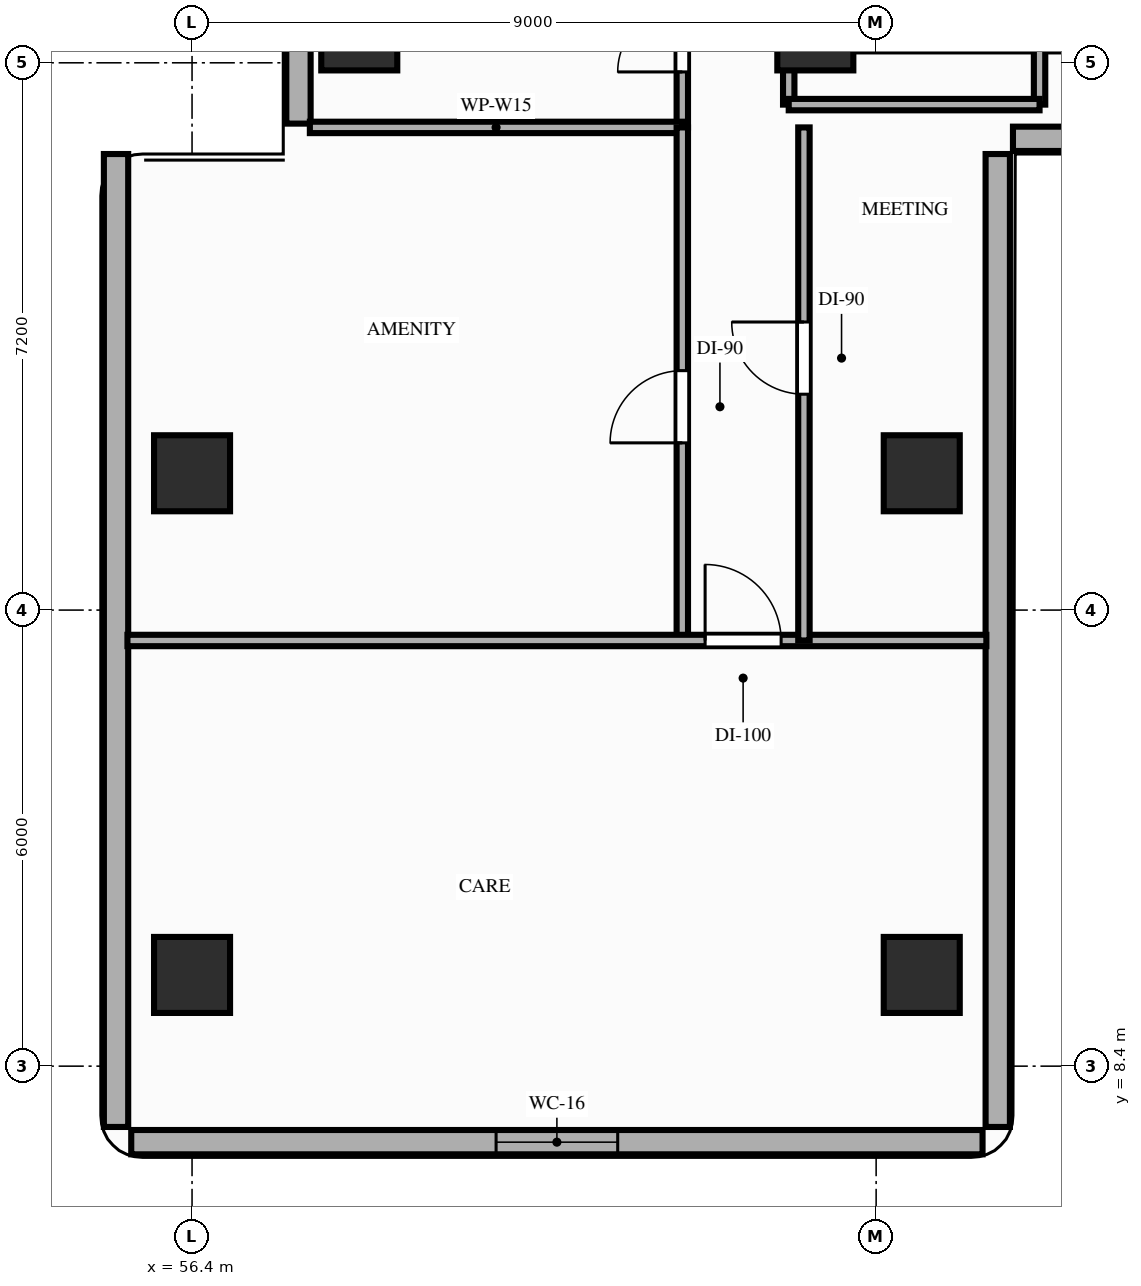
"""IFC4 building model, lengths in metres.
Left out: names, types, materials, properties, quantities, classifications, styles, units other than length and angle.
Written with IfcOpenShell. Run it as: python <this file> out.ifc"""

import sys

from ifc_helpers import new_model, si_unit, direction, frame, frame_2d, origin, origin_2d, place, context, subcontext, project, spatial, rectangle, extrude, element, fill, save


model = new_model("IFC4")
c1 = context("Model", 3, precision=1e-05, world=origin(), true_north=direction((0.0, 1.0)))
c2 = subcontext(c1, "Body", "Model", "MODEL_VIEW")
j1 = project(units=[si_unit("LENGTHUNIT", "METRE"), si_unit("PLANEANGLEUNIT", "RADIAN")], contexts=[c1])
p1 = place(None, origin())
s1 = spatial("IfcSite", under=j1, at=p1, CompositionType="ELEMENT")
p2 = place(p1, origin())
s2 = spatial("IfcBuilding", under=s1, at=p2, CompositionType="ELEMENT")
p3 = place(p2, frame((0.0, 0.0, 50.0)))
s3 = spatial("IfcBuildingStorey", under=s2, at=p3, CompositionType="ELEMENT", Elevation=50.0)
for number, where, z_axis, x_axis in (
    (1, (64.6, 22.0, 0.0), (0.0, 0.0, 1.0), (1.0, 0.0, 0.0)),
    (2, (58.6, 22.0, 0.0), (0.0, 0.0, 1.0), (1.0, 0.0, 0.0)),
    (3, (56.4, 9.6, 0.0), (0.0, 0.0, 1.0), (1.0, 0.0, 0.0)),
    (4, (56.4, 16.2, 0.0), (0.0, 0.0, 1.0), (1.0, 0.0, 0.0)),
    (5, (66.0, 9.6, 0.0), (0.0, 0.0, 1.0), (1.0, 0.0, 0.0)),
    (6, (66.0, 16.2, 0.0), (0.0, 0.0, 1.0), (1.0, 0.0, 0.0)),
):
    element("IfcColumn", number, at=place(p3, frame(where, z_axis=z_axis, x_axis=x_axis)), inside=s3, PredefinedType="COLUMN", context=c2, shape_type="SweptSolid", body=[
        extrude(rectangle(XDim=1.0, YDim=1.0, at=origin_2d()), origin(), (0.0, 0.0, 1.0), 3.2),
    ])
p4 = place(p3, frame((57.8, 43.4, 0.0), z_axis=(0.0, 0.0, 1.0), x_axis=(0.0, -1.0, 0.0)))
e7 = element("IfcWall", 7, at=p4, inside=s3, PredefinedType="STANDARD", context=c2, shape_type="SweptSolid", body=[
    extrude(rectangle(XDim=22.6, YDim=0.32, at=frame_2d((11.3, 0.0))), origin(), (0.0, 0.0, 1.0), 2.51),
])
p5 = place(p4, frame((3.7, 0.0, 0.0)))
e8 = element("IfcOpeningElement", 8, at=p5, cuts=e7, PredefinedType="OPENING", context=c2, shape_type="SweptSolid", body=[
    extrude(rectangle(XDim=1.4, YDim=2.1, at=frame_2d((0.7, 1.05))), frame((0.0, 0.17, 0.0), z_axis=(0.0, -1.0, 0.0), x_axis=(1.0, 0.0, 0.0)), (0.0, 0.0, 1.0), 0.34),
])
p6 = place(p3, frame((55.6, 7.4, 0.0), z_axis=(0.0, 0.0, 1.0), x_axis=(1.0, 0.0, 0.0)))
e9 = element("IfcWall", 9, at=p6, inside=s3, PredefinedType="STANDARD", context=c2, shape_type="SweptSolid", body=[
    extrude(rectangle(XDim=11.2, YDim=0.32, at=frame_2d((5.6, 0.0))), origin(), (0.0, 0.0, 1.0), 3.02),
])
p7 = place(p6, frame((4.8, 0.0, 0.85)))
e10 = element("IfcOpeningElement", 10, at=p7, cuts=e9, PredefinedType="OPENING", context=c2, shape_type="SweptSolid", body=[
    extrude(rectangle(XDim=1.6, YDim=1.7, at=frame_2d((0.8, 0.85))), frame((0.0, 0.17, 0.0), z_axis=(0.0, -1.0, 0.0), x_axis=(1.0, 0.0, 0.0)), (0.0, 0.0, 1.0), 0.34),
])
for number, where, z_axis, x_axis in (
    (11, (55.4, 20.4, 0.0), (0.0, 0.0, 1.0), (0.0, -1.0, 0.0)),
    (12, (67.0, 7.6, 0.0), (0.0, 0.0, 1.0), (0.0, 1.0, 0.0)),
):
    element("IfcWall", number, at=place(p3, frame(where, z_axis=z_axis, x_axis=x_axis)), inside=s3, PredefinedType="STANDARD", context=c2, shape_type="SweptSolid", body=[
        extrude(rectangle(XDim=12.8, YDim=0.32, at=frame_2d((6.4, 0.0))), origin(), (0.0, 0.0, 1.0), 3.02),
    ])
p8 = place(p3, frame((67.2, 20.6, 0.0), z_axis=(0.0, 0.0, 1.0), x_axis=(1.0, 0.0, 0.0)))
e13 = element("IfcWall", 13, at=p8, inside=s3, PredefinedType="STANDARD", context=c2, shape_type="SweptSolid", body=[
    extrude(rectangle(XDim=5.6, YDim=0.32, at=frame_2d((2.8, 0.0))), origin(), (0.0, 0.0, 1.0), 3.02),
])
p9 = place(p3, frame((64.25, 21.05, 0.0), z_axis=(0.0, 0.0, 1.0), x_axis=(0.0, 1.0, 0.0)))
e14 = element("IfcWall", 14, at=p9, inside=s3, PredefinedType="PARTITIONING", context=c2, shape_type="SweptSolid", body=[
    extrude(rectangle(XDim=6.55, YDim=0.15, at=frame_2d((3.275, 0.0))), origin(), (0.0, 0.0, 1.0), 2.51),
])
p10 = place(p9, frame((3.1, 0.0, 0.0)))
e15 = element("IfcOpeningElement", 15, at=p10, cuts=e14, PredefinedType="OPENING", context=c2, shape_type="SweptSolid", body=[
    extrude(rectangle(XDim=0.95, YDim=2.15, at=frame_2d((0.475, 1.075))), frame((0.0, 0.085, 0.0), z_axis=(0.0, -1.0, 0.0), x_axis=(1.0, 0.0, 0.0)), (0.0, 0.0, 1.0), 0.17),
])
p11 = place(p3, frame((67.55, 21.05, 0.0), z_axis=(0.0, 0.0, 1.0), x_axis=(0.0, 1.0, 0.0)))
e16 = element("IfcWall", 16, at=p11, inside=s3, PredefinedType="PARTITIONING", context=c2, shape_type="SweptSolid", body=[
    extrude(rectangle(XDim=6.47, YDim=0.15, at=frame_2d((3.235, 0.0))), origin(), (0.0, 0.0, 1.0), 2.51),
])
p12 = place(p3, frame((64.25, 21.05, 0.0), z_axis=(0.0, 0.0, 1.0), x_axis=(1.0, 0.0, 0.0)))
e17 = element("IfcWall", 17, at=p12, inside=s3, PredefinedType="PARTITIONING", context=c2, shape_type="SweptSolid", body=[
    extrude(rectangle(XDim=3.3, YDim=0.15, at=frame_2d((1.65, 0.0))), origin(), (0.0, 0.0, 1.0), 2.51),
])
p13 = place(p3, frame((62.85, 20.75, 0.0), z_axis=(0.0, 0.0, 1.0), x_axis=(0.0, 1.0, 0.0)))
e18 = element("IfcWall", 18, at=p13, inside=s3, PredefinedType="PARTITIONING", context=c2, shape_type="SweptSolid", body=[
    extrude(rectangle(XDim=22.7, YDim=0.15, at=frame_2d((11.35, 0.0))), origin(), (0.0, 0.0, 1.0), 2.51),
])
p14 = place(p13, frame((0.73, 0.0, 0.0)))
e19 = element("IfcOpeningElement", 19, at=p14, cuts=e18, PredefinedType="OPENING", context=c2, shape_type="SweptSolid", body=[
    extrude(rectangle(XDim=0.85, YDim=2.1, at=frame_2d((0.425, 1.05))), frame((0.0, 0.085, 0.0), z_axis=(0.0, -1.0, 0.0), x_axis=(1.0, 0.0, 0.0)), (0.0, 0.0, 1.0), 0.17),
])
p15 = place(p13, frame((3.43, 0.0, 0.0)))
e20 = element("IfcOpeningElement", 20, at=p15, cuts=e18, PredefinedType="OPENING", context=c2, shape_type="SweptSolid", body=[
    extrude(rectangle(XDim=0.95, YDim=2.1, at=frame_2d((0.475, 1.05))), frame((0.0, 0.085, 0.0), z_axis=(0.0, -1.0, 0.0), x_axis=(1.0, 0.0, 0.0)), (0.0, 0.0, 1.0), 0.17),
])
p16 = place(p13, frame((8.15, 0.0, 0.0)))
e21 = element("IfcOpeningElement", 21, at=p16, cuts=e18, PredefinedType="OPENING", context=c2, shape_type="SweptSolid", body=[
    extrude(rectangle(XDim=0.95, YDim=2.15, at=frame_2d((0.475, 1.075))), frame((0.0, 0.085, 0.0), z_axis=(0.0, -1.0, 0.0), x_axis=(1.0, 0.0, 0.0)), (0.0, 0.0, 1.0), 0.17),
])
p17 = place(p13, frame((18.89, 0.0, 0.0)))
e22 = element("IfcOpeningElement", 22, at=p17, cuts=e18, PredefinedType="OPENING", context=c2, shape_type="SweptSolid", body=[
    extrude(rectangle(XDim=0.95, YDim=2.15, at=frame_2d((0.475, 1.075))), frame((0.0, 0.085, 0.0), z_axis=(0.0, -1.0, 0.0), x_axis=(1.0, 0.0, 0.0)), (0.0, 0.0, 1.0), 0.17),
])
p18 = place(p3, frame((57.95, 20.75, 0.0), z_axis=(0.0, 0.0, 1.0), x_axis=(1.0, 0.0, 0.0)))
e23 = element("IfcWall", 23, at=p18, inside=s3, PredefinedType="PARTITIONING", context=c2, shape_type="SweptSolid", body=[
    extrude(rectangle(XDim=4.9, YDim=0.15, at=frame_2d((2.45, 0.0))), origin(), (0.0, 0.0, 1.0), 2.51),
])
p19 = place(p3, frame((62.85, 14.0, 0.0), z_axis=(0.0, 0.0, 1.0), x_axis=(0.0, 1.0, 0.0)))
e24 = element("IfcWall", 24, at=p19, inside=s3, PredefinedType="PARTITIONING", context=c2, shape_type="SweptSolid", body=[
    extrude(rectangle(XDim=6.75, YDim=0.15, at=frame_2d((3.375, 0.0))), origin(), (0.0, 0.0, 1.0), 2.51),
])
p20 = place(p19, frame((2.6, 0.0, 0.0)))
e25 = element("IfcOpeningElement", 25, at=p20, cuts=e24, PredefinedType="OPENING", context=c2, shape_type="SweptSolid", body=[
    extrude(rectangle(XDim=0.95, YDim=2.15, at=frame_2d((0.475, 1.075))), frame((0.0, 0.085, 0.0), z_axis=(0.0, -1.0, 0.0), x_axis=(1.0, 0.0, 0.0)), (0.0, 0.0, 1.0), 0.17),
])
p21 = place(p3, frame((55.55, 14.0, 0.0), z_axis=(0.0, 0.0, 1.0), x_axis=(1.0, 0.0, 0.0)))
e26 = element("IfcWall", 26, at=p21, inside=s3, PredefinedType="PARTITIONING", context=c2, shape_type="SweptSolid", body=[
    extrude(rectangle(XDim=11.3, YDim=0.15, at=frame_2d((5.65, 0.0))), origin(), (0.0, 0.0, 1.0), 2.51),
])
p22 = place(p21, frame((7.6, 0.0, 0.0)))
e27 = element("IfcOpeningElement", 27, at=p22, cuts=e26, PredefinedType="OPENING", context=c2, shape_type="SweptSolid", body=[
    extrude(rectangle(XDim=1.0, YDim=2.15, at=frame_2d((0.5, 1.075))), frame((0.0, 0.085, 0.0), z_axis=(0.0, -1.0, 0.0), x_axis=(1.0, 0.0, 0.0)), (0.0, 0.0, 1.0), 0.17),
])
p23 = place(p3, frame((64.45, 14.0, 0.0), z_axis=(0.0, 0.0, 1.0), x_axis=(0.0, 1.0, 0.0)))
e28 = element("IfcWall", 28, at=p23, inside=s3, PredefinedType="PARTITIONING", context=c2, shape_type="SweptSolid", body=[
    extrude(rectangle(XDim=6.75, YDim=0.15, at=frame_2d((3.375, 0.0))), origin(), (0.0, 0.0, 1.0), 2.51),
])
p24 = place(p23, frame((3.24, 0.0, 0.0)))
e29 = element("IfcOpeningElement", 29, at=p24, cuts=e28, PredefinedType="OPENING", context=c2, shape_type="SweptSolid", body=[
    extrude(rectangle(XDim=0.95, YDim=2.15, at=frame_2d((0.475, 1.075))), frame((0.0, 0.085, 0.0), z_axis=(0.0, -1.0, 0.0), x_axis=(1.0, 0.0, 0.0)), (0.0, 0.0, 1.0), 0.17),
])
p25 = place(p7, origin())
e30 = element("IfcWindow", 30, at=p25, inside=s3, PartitioningType="SINGLE_PANEL", PredefinedType="WINDOW", context=c2, shape_type="SweptSolid", body=[
    extrude(rectangle(XDim=1.6, YDim=1.7, at=frame_2d((0.8, 0.85))), frame((0.0, 0.03, 0.0), z_axis=(0.0, -1.0, 0.0), x_axis=(1.0, 0.0, 0.0)), (0.0, 0.0, 1.0), 0.06),
])
fill(e10, e30)
p26 = place(p14, origin())
e31 = element("IfcDoor", 31, at=p26, inside=s3, OperationType="SINGLE_SWING_LEFT", PredefinedType="DOOR", context=c2, shape_type="SweptSolid", body=[
    extrude(rectangle(XDim=0.85, YDim=2.1, at=frame_2d((0.425, 1.05))), frame((0.0, 0.025, 0.0), z_axis=(0.0, -1.0, 0.0), x_axis=(1.0, 0.0, 0.0)), (0.0, 0.0, 1.0), 0.05),
])
fill(e19, e31)
p27 = place(p20, origin())
e32 = element("IfcDoor", 32, at=p27, inside=s3, OperationType="SINGLE_SWING_LEFT", PredefinedType="DOOR", context=c2, shape_type="SweptSolid", body=[
    extrude(rectangle(XDim=0.95, YDim=2.15, at=frame_2d((0.475, 1.075))), frame((0.0, 0.025, 0.0), z_axis=(0.0, -1.0, 0.0), x_axis=(1.0, 0.0, 0.0)), (0.0, 0.0, 1.0), 0.05),
])
fill(e25, e32)
p28 = place(p24, origin())
e33 = element("IfcDoor", 33, at=p28, inside=s3, OperationType="SINGLE_SWING_RIGHT", PredefinedType="DOOR", context=c2, shape_type="SweptSolid", body=[
    extrude(rectangle(XDim=0.95, YDim=2.15, at=frame_2d((0.475, 1.075))), frame((0.0, 0.025, 0.0), z_axis=(0.0, -1.0, 0.0), x_axis=(1.0, 0.0, 0.0)), (0.0, 0.0, 1.0), 0.05),
])
fill(e29, e33)
p29 = place(p22, origin())
e34 = element("IfcDoor", 34, at=p29, inside=s3, OperationType="SINGLE_SWING_LEFT", PredefinedType="DOOR", context=c2, shape_type="SweptSolid", body=[
    extrude(rectangle(XDim=1.0, YDim=2.15, at=frame_2d((0.5, 1.075))), frame((0.0, 0.025, 0.0), z_axis=(0.0, -1.0, 0.0), x_axis=(1.0, 0.0, 0.0)), (0.0, 0.0, 1.0), 0.05),
])
fill(e27, e34)
save(model, sys.argv[1])
